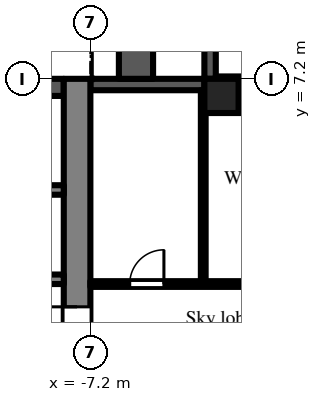
"""IFC4 building model, lengths in metres.
Left out: names, types, materials, properties, quantities, classifications, styles, units other than length and angle.
Written with IfcOpenShell. Run it as: python <this file> out.ifc"""

import sys

from ifc_helpers import new_model, si_unit, direction, frame, frame_2d, origin, origin_2d, place, context, subcontext, project, spatial, rectangle, extrude, element, fill, save


model = new_model("IFC4")
c1 = context("Model", 3, precision=1e-05, world=origin(), true_north=direction((0.0, 1.0)))
c2 = subcontext(c1, "Body", "Model", "MODEL_VIEW")
j1 = project(units=[si_unit("LENGTHUNIT", "METRE"), si_unit("PLANEANGLEUNIT", "RADIAN")], contexts=[c1])
p1 = place(None, origin())
s1 = spatial("IfcSite", under=j1, at=p1, CompositionType="ELEMENT")
p2 = place(p1, origin())
s2 = spatial("IfcBuilding", under=s1, at=p2, CompositionType="ELEMENT")
p3 = place(p2, frame((0.0, 0.0, 116.1)))
s3 = spatial("IfcBuildingStorey", under=s2, at=p3, CompositionType="ELEMENT", Elevation=116.1)
p4 = place(p3, frame((-3.75, 6.75, 0.0), z_axis=(0.0, 0.0, 1.0), x_axis=(1.0, 0.0, 0.0)))
e1 = element("IfcColumn", 1, at=p4, inside=s3, PredefinedType="COLUMN", context=c2, shape_type="SweptSolid", body=[
    extrude(rectangle(XDim=0.9, YDim=0.9, at=origin_2d()), origin(), (0.0, 0.0, 1.0), 4.2),
])
p5 = place(p3, frame((-4.05, 14.4, 0.0), z_axis=(0.0, 0.0, 1.0), x_axis=(0.0, -1.0, 0.0)))
e2 = element("IfcWall", 2, at=p5, inside=s3, PredefinedType="SOLIDWALL", context=c2, shape_type="SweptSolid", body=[
    extrude(rectangle(XDim=7.2, YDim=0.3, at=frame_2d((3.6, 0.0))), origin(), (0.0, 0.0, 1.0), 3.4),
])
p6 = place(p5, frame((3.0, 0.0, 0.0)))
e3 = element("IfcOpeningElement", 3, at=p6, cuts=e2, PredefinedType="OPENING", context=c2, shape_type="SweptSolid", body=[
    extrude(rectangle(XDim=1.2, YDim=2.05, at=frame_2d((0.6, 1.025))), frame((0.0, 0.16, 0.0), z_axis=(0.0, -1.0, 0.0), x_axis=(1.0, 0.0, 0.0)), (0.0, 0.0, 1.0), 0.32),
])
p7 = place(p5, frame((0.9, 0.0, 0.2)))
e4 = element("IfcOpeningElement", 4, at=p7, cuts=e2, PredefinedType="OPENING", context=c2, shape_type="SweptSolid", body=[
    extrude(rectangle(XDim=1.8, YDim=1.85, at=frame_2d((0.9, 0.925))), frame((0.0, 0.16, 0.0), z_axis=(0.0, -1.0, 0.0), x_axis=(1.0, 0.0, 0.0)), (0.0, 0.0, 1.0), 0.32),
])
p8 = place(p5, frame((4.5, 0.0, 0.2)))
e5 = element("IfcOpeningElement", 5, at=p8, cuts=e2, PredefinedType="OPENING", context=c2, shape_type="SweptSolid", body=[
    extrude(rectangle(XDim=1.8, YDim=1.85, at=frame_2d((0.9, 0.925))), frame((0.0, 0.16, 0.0), z_axis=(0.0, -1.0, 0.0), x_axis=(1.0, 0.0, 0.0)), (0.0, 0.0, 1.0), 0.32),
])
p9 = place(p3, frame((-4.2, 7.05, 0.0), z_axis=(0.0, 0.0, 1.0), x_axis=(-1.0, 0.0, 0.0)))
e6 = element("IfcWall", 6, at=p9, inside=s3, PredefinedType="SOLIDWALL", context=c2, shape_type="SweptSolid", body=[
    extrude(rectangle(XDim=3.0, YDim=0.3, at=frame_2d((1.5, 0.0))), origin(), (0.0, 0.0, 1.0), 3.4),
])
p10 = place(p3, frame((-6.0, 7.2, 0.0), z_axis=(0.0, 0.0, 1.0), x_axis=(0.0, 1.0, 0.0)))
e7 = element("IfcWall", 7, at=p10, inside=s3, PredefinedType="PARAPET", context=c2, shape_type="SweptSolid", body=[
    extrude(rectangle(XDim=7.2, YDim=0.9, at=frame_2d((3.6, 0.0))), origin(), (0.0, 0.0, 1.0), 0.8),
])
p11 = place(p3, frame((-7.55, -7.2, 0.0), z_axis=(0.0, 0.0, 1.0), x_axis=(0.0, 1.0, 0.0)))
e8 = element("IfcWall", 8, at=p11, inside=s3, PredefinedType="SHEAR", context=c2, shape_type="SweptSolid", body=[
    extrude(rectangle(XDim=14.4, YDim=0.7, at=frame_2d((7.2, 0.0))), origin(), (0.0, 0.0, 1.0), 3.8),
])
p12 = place(p11, frame((6.0, 0.0, 0.0)))
e9 = element("IfcOpeningElement", 9, at=p12, cuts=e8, PredefinedType="OPENING", context=c2, shape_type="SweptSolid", body=[
    extrude(rectangle(XDim=2.4, YDim=2.2, at=frame_2d((1.2, 1.1))), frame((0.0, 0.36, 0.0), z_axis=(0.0, -1.0, 0.0), x_axis=(1.0, 0.0, 0.0)), (0.0, 0.0, 1.0), 0.72),
])
p13 = place(p3, frame((-7.9, 6.975, 0.0), z_axis=(0.0, 0.0, 1.0), x_axis=(-1.0, 0.0, 0.0)))
e10 = element("IfcWall", 10, at=p13, inside=s3, PredefinedType="SHEAR", context=c2, shape_type="SweptSolid", body=[
    extrude(rectangle(XDim=12.95, YDim=0.45, at=frame_2d((6.475, 0.0))), origin(), (0.0, 0.0, 1.0), 3.8),
])
p14 = place(p3, frame((-7.9, 1.925, 0.0), z_axis=(0.0, 0.0, 1.0), x_axis=(-1.0, 0.0, 0.0)))
e11 = element("IfcWall", 11, at=p14, inside=s3, PredefinedType="SHEAR", context=c2, shape_type="SweptSolid", body=[
    extrude(rectangle(XDim=12.95, YDim=0.25, at=frame_2d((6.475, 0.0))), origin(), (0.0, 0.0, 1.0), 3.8),
])
p15 = place(p14, frame((4.825, 0.0, 0.0)))
e12 = element("IfcOpeningElement", 12, at=p15, cuts=e11, PredefinedType="OPENING", context=c2, shape_type="SweptSolid", body=[
    extrude(rectangle(XDim=1.1, YDim=2.1, at=frame_2d((0.55, 1.05))), frame((0.0, 0.135, 0.0), z_axis=(0.0, -1.0, 0.0), x_axis=(1.0, 0.0, 0.0)), (0.0, 0.0, 1.0), 0.27),
])
p16 = place(p14, frame((7.025, 0.0, 0.0)))
e13 = element("IfcOpeningElement", 13, at=p16, cuts=e11, PredefinedType="OPENING", context=c2, shape_type="SweptSolid", body=[
    extrude(rectangle(XDim=1.1, YDim=2.1, at=frame_2d((0.55, 1.05))), frame((0.0, 0.135, 0.0), z_axis=(0.0, -1.0, 0.0), x_axis=(1.0, 0.0, 0.0)), (0.0, 0.0, 1.0), 0.27),
])
p17 = place(p14, frame((9.225, 0.0, 0.0)))
e14 = element("IfcOpeningElement", 14, at=p17, cuts=e11, PredefinedType="OPENING", context=c2, shape_type="SweptSolid", body=[
    extrude(rectangle(XDim=1.1, YDim=2.1, at=frame_2d((0.55, 1.05))), frame((0.0, 0.135, 0.0), z_axis=(0.0, -1.0, 0.0), x_axis=(1.0, 0.0, 0.0)), (0.0, 0.0, 1.0), 0.27),
])
p18 = place(p14, frame((11.425, 0.0, 0.0)))
e15 = element("IfcOpeningElement", 15, at=p18, cuts=e11, PredefinedType="OPENING", context=c2, shape_type="SweptSolid", body=[
    extrude(rectangle(XDim=1.1, YDim=2.1, at=frame_2d((0.55, 1.05))), frame((0.0, 0.135, 0.0), z_axis=(0.0, -1.0, 0.0), x_axis=(1.0, 0.0, 0.0)), (0.0, 0.0, 1.0), 0.27),
])
p19 = place(p14, frame((0.525, 0.0, 0.0)))
e16 = element("IfcOpeningElement", 16, at=p19, cuts=e11, PredefinedType="OPENING", context=c2, shape_type="SweptSolid", body=[
    extrude(rectangle(XDim=0.9, YDim=2.1, at=frame_2d((0.45, 1.05))), frame((0.0, 0.135, 0.0), z_axis=(0.0, -1.0, 0.0), x_axis=(1.0, 0.0, 0.0)), (0.0, 0.0, 1.0), 0.27),
])
p20 = place(p14, frame((2.575, 0.0, 0.0)))
e17 = element("IfcOpeningElement", 17, at=p20, cuts=e11, PredefinedType="OPENING", context=c2, shape_type="SweptSolid", body=[
    extrude(rectangle(XDim=1.2, YDim=2.1, at=frame_2d((0.6, 1.05))), frame((0.0, 0.135, 0.0), z_axis=(0.0, -1.0, 0.0), x_axis=(1.0, 0.0, 0.0)), (0.0, 0.0, 1.0), 0.27),
])
p21 = place(p3, frame((-7.9, 4.275, 0.0), z_axis=(0.0, 0.0, 1.0), x_axis=(-1.0, 0.0, 0.0)))
e18 = element("IfcWall", 18, at=p21, inside=s3, PredefinedType="SHEAR", context=c2, shape_type="SweptSolid", body=[
    extrude(rectangle(XDim=1.95, YDim=0.25, at=frame_2d((0.975, 0.0))), origin(), (0.0, 0.0, 1.0), 3.8),
])
p22 = place(p3, frame((-7.2, 1.8, 0.0), z_axis=(0.0, 0.0, 1.0), x_axis=(1.0, 0.0, 0.0)))
e19 = element("IfcWall", 19, at=p22, inside=s3, PredefinedType="PARTITIONING", context=c2, shape_type="SweptSolid", body=[
    extrude(rectangle(XDim=5.325, YDim=0.15, at=frame_2d((2.663, 0.0))), origin(), (0.0, 0.0, 1.0), 3.8),
])
p23 = place(p22, frame((1.035, 0.0, 0.0)))
e20 = element("IfcOpeningElement", 20, at=p23, cuts=e19, PredefinedType="OPENING", context=c2, shape_type="SweptSolid", body=[
    extrude(rectangle(XDim=0.9, YDim=2.1, at=frame_2d((0.45, 1.05))), frame((0.0, 0.085, 0.0), z_axis=(0.0, -1.0, 0.0), x_axis=(1.0, 0.0, 0.0)), (0.0, 0.0, 1.0), 0.17),
])
p24 = place(p3, frame((-4.23, 1.875, 0.0), z_axis=(0.0, 0.0, 1.0), x_axis=(0.0, 1.0, 0.0)))
e21 = element("IfcWall", 21, at=p24, inside=s3, PredefinedType="PARTITIONING", context=c2, shape_type="SweptSolid", body=[
    extrude(rectangle(XDim=5.025, YDim=0.125, at=frame_2d((2.512, 0.0))), origin(), (0.0, 0.0, 1.0), 3.8),
])
p25 = place(p3, frame((-3.9, 7.2, 0.0), z_axis=(0.0, 0.0, 1.0), x_axis=(1.0, 0.0, 0.0)))
e22 = element("IfcWall", 22, at=p25, inside=s3, PredefinedType="PARTITIONING", context=c2, shape_type="SweptSolid", body=[
    extrude(rectangle(XDim=2.1, YDim=0.125, at=frame_2d((1.05, 0.0))), origin(), (0.0, 0.0, 1.0), 3.8),
])
p26 = place(p12, origin())
e23 = element("IfcDoor", 23, at=p26, inside=s3, OperationType="DOUBLE_DOOR_DOUBLE_SWING", PredefinedType="DOOR", context=c2, shape_type="SweptSolid", body=[
    extrude(rectangle(XDim=2.4, YDim=2.2, at=frame_2d((1.2, 1.1))), frame((0.0, 0.025, 0.0), z_axis=(0.0, -1.0, 0.0), x_axis=(1.0, 0.0, 0.0)), (0.0, 0.0, 1.0), 0.05),
])
fill(e9, e23)
p27 = place(p23, origin())
e24 = element("IfcDoor", 24, at=p27, inside=s3, OperationType="SINGLE_SWING_RIGHT", PredefinedType="DOOR", context=c2, shape_type="SweptSolid", body=[
    extrude(rectangle(XDim=0.9, YDim=2.1, at=frame_2d((0.45, 1.05))), frame((0.0, 0.025, 0.0), z_axis=(0.0, -1.0, 0.0), x_axis=(1.0, 0.0, 0.0)), (0.0, 0.0, 1.0), 0.05),
])
fill(e20, e24)
save(model, sys.argv[1])
